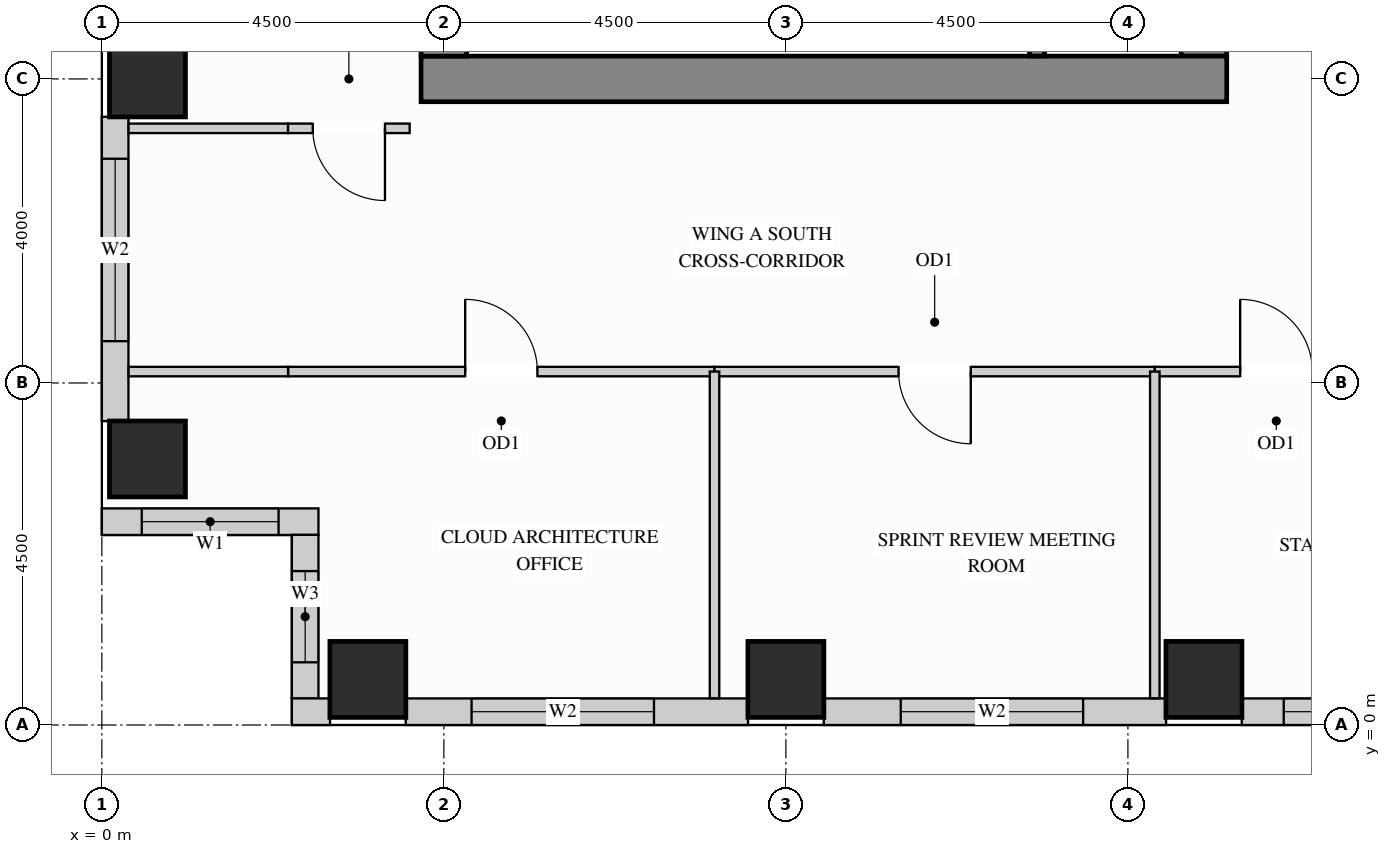
"""IFC4 building model, lengths in metres.
Left out: names, types, materials, properties, quantities, classifications, styles, units other than length and angle.
Written with IfcOpenShell. Run it as: python <this file> out.ifc"""

import sys

from ifc_helpers import new_model, si_unit, direction, frame, frame_2d, origin, origin_2d, place, context, subcontext, project, spatial, rectangle, extrude, source, transform, mapped, element, fill, save


model = new_model("IFC4")
c1 = context("Model", 3, precision=1e-05, world=origin(), true_north=direction((0.0, 1.0)))
c2 = subcontext(c1, "Body", "Model", "MODEL_VIEW")
j1 = project(units=[si_unit("LENGTHUNIT", "METRE"), si_unit("PLANEANGLEUNIT", "RADIAN")], contexts=[c1])
p1 = place(None, origin())
s1 = spatial("IfcSite", under=j1, at=p1, CompositionType="ELEMENT")
p2 = place(p1, origin())
s2 = spatial("IfcBuilding", under=s1, at=p2, CompositionType="ELEMENT")
p3 = place(p2, frame((0.0, 0.0, 168.3)))
s3 = spatial("IfcBuildingStorey", under=s2, at=p3, CompositionType="ELEMENT", Elevation=168.3)
m1 = source(origin(), c2, "Body", "SweptSolid", [
    extrude(rectangle(XDim=1.0, YDim=1.0, at=origin_2d()), origin(), (0.0, 0.0, 1.0), 3.4),
])
for number, where, z_axis, x_axis in (
    (1, (14.5, 0.6, 0.0), (0.0, 0.0, 1.0), (1.0, 0.0, 0.0)),
    (2, (3.5, 0.6, 0.0), (0.0, 0.0, 1.0), (1.0, 0.0, 0.0)),
    (3, (9.0, 0.6, 0.0), (0.0, 0.0, 1.0), (1.0, 0.0, 0.0)),
    (4, (0.6, 3.5, 0.0), (0.0, 0.0, 1.0), (1.0, 0.0, 0.0)),
    (5, (0.6, 8.5, 0.0), (0.0, 0.0, 1.0), (1.0, 0.0, 0.0)),
):
    element("IfcColumn", number, at=place(p3, frame(where, z_axis=z_axis, x_axis=x_axis)), inside=s3, PredefinedType="COLUMN", context=c2, shape_type="MappedRepresentation", body=[
        mapped(m1, transform((0.0, 0.0, 0.0), x_axis=(1.0, 0.0, 0.0), y_axis=(0.0, 1.0, 0.0), z_axis=(0.0, 0.0, 1.0))),
    ])
m2 = source(origin(), c2, "Body", "SweptSolid", [
    extrude(rectangle(XDim=10.02, YDim=0.6, at=frame_2d((5.01, 0.0))), origin(), (0.0, 0.0, 1.0), 3.4),
])
p4 = place(p3, frame((14.5, 8.8, 0.0), z_axis=(0.0, 0.0, 1.0), x_axis=(0.0, 1.0, 0.0)))
e6 = element("IfcWall", 6, at=p4, inside=s3, PredefinedType="SHEAR", context=c2, shape_type="MappedRepresentation", body=[
    mapped(m2, transform((0.0, 0.0, 0.0), x_axis=(1.0, 0.0, 0.0), y_axis=(0.0, 1.0, 0.0), z_axis=(0.0, 0.0, 1.0))),
])
m3 = source(origin(), c2, "Body", "SweptSolid", [
    extrude(rectangle(XDim=10.6, YDim=0.6, at=frame_2d((5.3, 0.0))), origin(), (0.0, 0.0, 1.0), 3.4),
])
p5 = place(p3, frame((4.2, 8.5, 0.0), z_axis=(0.0, 0.0, 1.0), x_axis=(1.0, 0.0, 0.0)))
e7 = element("IfcWall", 7, at=p5, inside=s3, PredefinedType="SHEAR", context=c2, shape_type="MappedRepresentation", body=[
    mapped(m3, transform((0.0, 0.0, 0.0), x_axis=(1.0, 0.0, 0.0), y_axis=(0.0, 1.0, 0.0), z_axis=(0.0, 0.0, 1.0))),
])
m4 = source(origin(), c2, "Body", "SweptSolid", [
    extrude(rectangle(XDim=20.4, YDim=0.6, at=frame_2d((10.2, 0.0))), origin(), (0.0, 0.0, 1.0), 3.4),
])
p6 = place(p3, frame((4.5, 8.8, 0.0), z_axis=(0.0, 0.0, 1.0), x_axis=(0.0, 1.0, 0.0)))
e8 = element("IfcWall", 8, at=p6, inside=s3, PredefinedType="SHEAR", context=c2, shape_type="MappedRepresentation", body=[
    mapped(m4, transform((0.0, 0.0, 0.0), x_axis=(1.0, 0.0, 0.0), y_axis=(0.0, 1.0, 0.0), z_axis=(0.0, 0.0, 1.0))),
])
p7 = place(p3, frame((0.175, 8.002, 0.0), z_axis=(0.0, 0.0, 1.0), x_axis=(0.0, -1.0, 0.0)))
e9 = element("IfcWall", 9, at=p7, inside=s3, PredefinedType="SOLIDWALL", context=c2, shape_type="SweptSolid", body=[
    extrude(rectangle(XDim=4.004, YDim=0.35, at=frame_2d((2.002, 0.0))), origin(), (0.0, 0.0, 1.0), 2.612),
])
p8 = place(p7, frame((0.552, 0.0, 0.78)))
e10 = element("IfcOpeningElement", 10, at=p8, cuts=e9, PredefinedType="OPENING", context=c2, shape_type="SweptSolid", body=[
    extrude(rectangle(XDim=2.4, YDim=1.652, at=frame_2d((1.2, 0.826))), frame((0.0, 0.185, 0.0), z_axis=(0.0, -1.0, 0.0), x_axis=(1.0, 0.0, 0.0)), (0.0, 0.0, 1.0), 0.37),
])
p9 = place(p3, frame((0.0, 2.675, 0.0), z_axis=(0.0, 0.0, 1.0), x_axis=(1.0, 0.0, 0.0)))
e11 = element("IfcWall", 11, at=p9, inside=s3, PredefinedType="SOLIDWALL", context=c2, shape_type="SweptSolid", body=[
    extrude(rectangle(XDim=2.85, YDim=0.35, at=frame_2d((1.425, 0.0))), origin(), (0.0, 0.0, 1.0), 3.385),
])
p10 = place(p9, frame((0.525, 0.0, 0.78)))
e12 = element("IfcOpeningElement", 12, at=p10, cuts=e11, PredefinedType="OPENING", context=c2, shape_type="SweptSolid", body=[
    extrude(rectangle(XDim=1.8, YDim=2.1, at=frame_2d((0.9, 1.05))), frame((0.0, 0.185, 0.0), z_axis=(0.0, -1.0, 0.0), x_axis=(1.0, 0.0, 0.0)), (0.0, 0.0, 1.0), 0.37),
])
p11 = place(p3, frame((2.675, 2.502, 0.0), z_axis=(0.0, 0.0, 1.0), x_axis=(0.0, -1.0, 0.0)))
e13 = element("IfcWall", 13, at=p11, inside=s3, PredefinedType="SOLIDWALL", context=c2, shape_type="SweptSolid", body=[
    extrude(rectangle(XDim=2.154, YDim=0.35, at=frame_2d((1.077, 0.0))), origin(), (0.0, 0.0, 1.0), 3.385),
])
p12 = place(p11, frame((0.477, 0.0, 0.78)))
e14 = element("IfcOpeningElement", 14, at=p12, cuts=e13, PredefinedType="OPENING", context=c2, shape_type="SweptSolid", body=[
    extrude(rectangle(XDim=1.2, YDim=2.1, at=frame_2d((0.6, 1.05))), frame((0.0, 0.185, 0.0), z_axis=(0.0, -1.0, 0.0), x_axis=(1.0, 0.0, 0.0)), (0.0, 0.0, 1.0), 0.37),
])
m5 = source(origin(), c2, "Body", "SweptSolid", [
    extrude(rectangle(XDim=0.502, YDim=0.35, at=frame_2d((0.251, 0.0))), origin(), (0.0, 0.0, 1.0), 3.385),
])
p13 = place(p3, frame((2.5, 0.175, 0.0), z_axis=(0.0, 0.0, 1.0), x_axis=(1.0, 0.0, 0.0)))
e15 = element("IfcWall", 15, at=p13, inside=s3, PredefinedType="SOLIDWALL", context=c2, shape_type="MappedRepresentation", body=[
    mapped(m5, transform((0.0, 0.0, 0.0), x_axis=(1.0, 0.0, 0.0), y_axis=(0.0, 1.0, 0.0), z_axis=(0.0, 0.0, 1.0))),
])
p14 = place(p3, frame((3.998, 0.175, 0.0), z_axis=(0.0, 0.0, 1.0), x_axis=(1.0, 0.0, 0.0)))
e16 = element("IfcWall", 16, at=p14, inside=s3, PredefinedType="SOLIDWALL", context=c2, shape_type="SweptSolid", body=[
    extrude(rectangle(XDim=4.504, YDim=0.35, at=frame_2d((2.252, 0.0))), origin(), (0.0, 0.0, 1.0), 2.612),
])
p15 = place(p14, frame((0.866, 0.0, 0.78)))
e17 = element("IfcOpeningElement", 17, at=p15, cuts=e16, PredefinedType="OPENING", context=c2, shape_type="SweptSolid", body=[
    extrude(rectangle(XDim=2.4, YDim=1.652, at=frame_2d((1.2, 0.826))), frame((0.0, 0.185, 0.0), z_axis=(0.0, -1.0, 0.0), x_axis=(1.0, 0.0, 0.0)), (0.0, 0.0, 1.0), 0.37),
])
p16 = place(p3, frame((9.498, 0.175, 0.0), z_axis=(0.0, 0.0, 1.0), x_axis=(1.0, 0.0, 0.0)))
e18 = element("IfcWall", 18, at=p16, inside=s3, PredefinedType="SOLIDWALL", context=c2, shape_type="SweptSolid", body=[
    extrude(rectangle(XDim=4.504, YDim=0.35, at=frame_2d((2.252, 0.0))), origin(), (0.0, 0.0, 1.0), 2.612),
])
p17 = place(p16, frame((1.013, 0.0, 0.78)))
e19 = element("IfcOpeningElement", 19, at=p17, cuts=e18, PredefinedType="OPENING", context=c2, shape_type="SweptSolid", body=[
    extrude(rectangle(XDim=2.4, YDim=1.652, at=frame_2d((1.2, 0.826))), frame((0.0, 0.185, 0.0), z_axis=(0.0, -1.0, 0.0), x_axis=(1.0, 0.0, 0.0)), (0.0, 0.0, 1.0), 0.37),
])
p18 = place(p3, frame((14.998, 0.175, 0.0), z_axis=(0.0, 0.0, 1.0), x_axis=(1.0, 0.0, 0.0)))
e20 = element("IfcWall", 20, at=p18, inside=s3, PredefinedType="SOLIDWALL", context=c2, shape_type="SweptSolid", body=[
    extrude(rectangle(XDim=3.504, YDim=0.35, at=frame_2d((1.752, 0.0))), origin(), (0.0, 0.0, 1.0), 2.612),
])
p19 = place(p18, frame((0.552, 0.0, 0.78)))
e21 = element("IfcOpeningElement", 21, at=p19, cuts=e20, PredefinedType="OPENING", context=c2, shape_type="SweptSolid", body=[
    extrude(rectangle(XDim=2.4, YDim=1.652, at=frame_2d((1.2, 0.826))), frame((0.0, 0.185, 0.0), z_axis=(0.0, -1.0, 0.0), x_axis=(1.0, 0.0, 0.0)), (0.0, 0.0, 1.0), 0.37),
])
m6 = source(origin(), c2, "Body", "SweptSolid", [
    extrude(rectangle(XDim=2.098, YDim=0.125, at=frame_2d((1.049, 0.0))), origin(), (0.0, 0.0, 1.0), 3.385),
])
p20 = place(p3, frame((0.352, 7.85, 0.0), z_axis=(0.0, 0.0, 1.0), x_axis=(1.0, 0.0, 0.0)))
e22 = element("IfcWall", 22, at=p20, inside=s3, PredefinedType="PARTITIONING", context=c2, shape_type="MappedRepresentation", body=[
    mapped(m6, transform((0.0, 0.0, 0.0), x_axis=(1.0, 0.0, 0.0), y_axis=(0.0, 1.0, 0.0), z_axis=(0.0, 0.0, 1.0))),
])
p21 = place(p3, frame((2.45, 7.85, 0.0), z_axis=(0.0, 0.0, 1.0), x_axis=(1.0, 0.0, 0.0)))
e23 = element("IfcWall", 23, at=p21, inside=s3, PredefinedType="PARTITIONING", context=c2, shape_type="SweptSolid", body=[
    extrude(rectangle(XDim=1.6, YDim=0.125, at=frame_2d((0.8, 0.0))), origin(), (0.0, 0.0, 1.0), 3.385),
])
p22 = place(p21, frame((0.325, 0.0, 0.0)))
e24 = element("IfcOpeningElement", 24, at=p22, cuts=e23, PredefinedType="OPENING", context=c2, shape_type="SweptSolid", body=[
    extrude(rectangle(XDim=0.95, YDim=2.15, at=frame_2d((0.475, 1.075))), frame((0.0, 0.073, 0.0), z_axis=(0.0, -1.0, 0.0), x_axis=(1.0, 0.0, 0.0)), (0.0, 0.0, 1.0), 0.145),
])
p23 = place(p3, frame((2.45, 4.65, 0.0), z_axis=(0.0, 0.0, 1.0), x_axis=(1.0, 0.0, 0.0)))
e25 = element("IfcWall", 25, at=p23, inside=s3, PredefinedType="PARTITIONING", context=c2, shape_type="SweptSolid", body=[
    extrude(rectangle(XDim=5.611, YDim=0.125, at=frame_2d((2.806, 0.0))), origin(), (0.0, 0.0, 1.0), 2.848),
])
p24 = place(p23, frame((2.331, 0.0, 0.0)))
e26 = element("IfcOpeningElement", 26, at=p24, cuts=e25, PredefinedType="OPENING", context=c2, shape_type="SweptSolid", body=[
    extrude(rectangle(XDim=0.95, YDim=2.15, at=frame_2d((0.475, 1.075))), frame((0.0, 0.073, 0.0), z_axis=(0.0, -1.0, 0.0), x_axis=(1.0, 0.0, 0.0)), (0.0, 0.0, 1.0), 0.145),
])
p25 = place(p3, frame((8.061, 4.65, 0.0), z_axis=(0.0, 0.0, 1.0), x_axis=(1.0, 0.0, 0.0)))
e27 = element("IfcWall", 27, at=p25, inside=s3, PredefinedType="PARTITIONING", context=c2, shape_type="SweptSolid", body=[
    extrude(rectangle(XDim=5.793, YDim=0.125, at=frame_2d((2.896, 0.0))), origin(), (0.0, 0.0, 1.0), 2.848),
])
p26 = place(p25, frame((2.421, 0.0, 0.0)))
e28 = element("IfcOpeningElement", 28, at=p26, cuts=e27, PredefinedType="OPENING", context=c2, shape_type="SweptSolid", body=[
    extrude(rectangle(XDim=0.95, YDim=2.15, at=frame_2d((0.475, 1.075))), frame((0.0, 0.073, 0.0), z_axis=(0.0, -1.0, 0.0), x_axis=(1.0, 0.0, 0.0)), (0.0, 0.0, 1.0), 0.145),
])
p27 = place(p3, frame((13.854, 4.65, 0.0), z_axis=(0.0, 0.0, 1.0), x_axis=(1.0, 0.0, 0.0)))
e29 = element("IfcWall", 29, at=p27, inside=s3, PredefinedType="PARTITIONING", context=c2, shape_type="SweptSolid", body=[
    extrude(rectangle(XDim=3.196, YDim=0.125, at=frame_2d((1.598, 0.0))), origin(), (0.0, 0.0, 1.0), 2.848),
])
p28 = place(p27, frame((1.123, 0.0, 0.0)))
e30 = element("IfcOpeningElement", 30, at=p28, cuts=e29, PredefinedType="OPENING", context=c2, shape_type="SweptSolid", body=[
    extrude(rectangle(XDim=0.95, YDim=2.15, at=frame_2d((0.475, 1.075))), frame((0.0, 0.073, 0.0), z_axis=(0.0, -1.0, 0.0), x_axis=(1.0, 0.0, 0.0)), (0.0, 0.0, 1.0), 0.145),
])
m7 = source(origin(), c2, "Body", "SweptSolid", [
    extrude(rectangle(XDim=2.098, YDim=0.125, at=frame_2d((1.049, 0.0))), origin(), (0.0, 0.0, 1.0), 2.848),
])
p29 = place(p3, frame((0.352, 4.65, 0.0), z_axis=(0.0, 0.0, 1.0), x_axis=(1.0, 0.0, 0.0)))
e31 = element("IfcWall", 31, at=p29, inside=s3, PredefinedType="PARTITIONING", context=c2, shape_type="MappedRepresentation", body=[
    mapped(m7, transform((0.0, 0.0, 0.0), x_axis=(1.0, 0.0, 0.0), y_axis=(0.0, 1.0, 0.0), z_axis=(0.0, 0.0, 1.0))),
])
m8 = source(origin(), c2, "Body", "SweptSolid", [
    extrude(rectangle(XDim=4.298, YDim=0.125, at=frame_2d((2.149, 0.0))), origin(), (0.0, 0.0, 1.0), 3.385),
])
for number, where, z_axis, x_axis in (
    (32, (8.061, 0.352, 0.0), (0.0, 0.0, 1.0), (0.0, 1.0, 0.0)),
    (33, (13.854, 0.352, 0.0), (0.0, 0.0, 1.0), (0.0, 1.0, 0.0)),
):
    element("IfcWall", number, at=place(p3, frame(where, z_axis=z_axis, x_axis=x_axis)), inside=s3, PredefinedType="PARTITIONING", context=c2, shape_type="MappedRepresentation", body=[
        mapped(m8, transform((0.0, 0.0, 0.0), x_axis=(1.0, 0.0, 0.0), y_axis=(0.0, 1.0, 0.0), z_axis=(0.0, 0.0, 1.0))),
    ])
m9 = source(origin(), c2, "Body", "SweptSolid", [
    extrude(rectangle(XDim=3.753, YDim=0.2, at=frame_2d((1.876, 0.0))), origin(), (0.0, 0.0, 1.0), 3.4),
])
p30 = place(p3, frame((12.305, 8.802, 0.0), z_axis=(0.0, 0.0, 1.0), x_axis=(0.0, 1.0, 0.0)))
e34 = element("IfcWall", 34, at=p30, inside=s3, PredefinedType="SHEAR", context=c2, shape_type="MappedRepresentation", body=[
    mapped(m9, transform((0.0, 0.0, 0.0), x_axis=(1.0, 0.0, 0.0), y_axis=(0.0, 1.0, 0.0), z_axis=(0.0, 0.0, 1.0))),
])
m10 = source(origin(), c2, "Body", "SweptSolid", [
    extrude(rectangle(XDim=0.95, YDim=2.15, at=frame_2d((0.475, 1.075))), frame((0.0, 0.025, 0.0), z_axis=(0.0, -1.0, 0.0), x_axis=(1.0, 0.0, 0.0)), (0.0, 0.0, 1.0), 0.05),
])
p31 = place(p24, origin())
e35 = element("IfcDoor", 35, at=p31, inside=s3, OperationType="SINGLE_SWING_LEFT", PredefinedType="DOOR", context=c2, shape_type="MappedRepresentation", body=[
    mapped(m10, transform((0.0, 0.0, 0.0), x_axis=(1.0, 0.0, 0.0), y_axis=(0.0, 1.0, 0.0), z_axis=(0.0, 0.0, 1.0))),
])
fill(e26, e35)
p32 = place(p26, origin())
e36 = element("IfcDoor", 36, at=p32, inside=s3, OperationType="SINGLE_SWING_RIGHT", PredefinedType="DOOR", context=c2, shape_type="MappedRepresentation", body=[
    mapped(m10, transform((0.0, 0.0, 0.0), x_axis=(1.0, 0.0, 0.0), y_axis=(0.0, 1.0, 0.0), z_axis=(0.0, 0.0, 1.0))),
])
fill(e28, e36)
p33 = place(p28, origin())
e37 = element("IfcDoor", 37, at=p33, inside=s3, OperationType="SINGLE_SWING_LEFT", PredefinedType="DOOR", context=c2, shape_type="MappedRepresentation", body=[
    mapped(m10, transform((0.0, 0.0, 0.0), x_axis=(1.0, 0.0, 0.0), y_axis=(0.0, 1.0, 0.0), z_axis=(0.0, 0.0, 1.0))),
])
fill(e30, e37)
p34 = place(p22, origin())
e38 = element("IfcDoor", 38, at=p34, inside=s3, OperationType="SINGLE_SWING_RIGHT", PredefinedType="DOOR", context=c2, shape_type="MappedRepresentation", body=[
    mapped(m10, transform((0.0, 0.0, 0.0), x_axis=(1.0, 0.0, 0.0), y_axis=(0.0, 1.0, 0.0), z_axis=(0.0, 0.0, 1.0))),
])
fill(e24, e38)
m11 = source(origin(), c2, "Body", "SweptSolid", [
    extrude(rectangle(XDim=1.8, YDim=2.1, at=frame_2d((0.9, 1.05))), frame((0.0, 0.03, 0.0), z_axis=(0.0, -1.0, 0.0), x_axis=(1.0, 0.0, 0.0)), (0.0, 0.0, 1.0), 0.06),
])
p35 = place(p10, origin())
e39 = element("IfcWindow", 39, at=p35, inside=s3, PartitioningType="SINGLE_PANEL", PredefinedType="WINDOW", context=c2, shape_type="MappedRepresentation", body=[
    mapped(m11, transform((0.0, 0.0, 0.0), x_axis=(1.0, 0.0, 0.0), y_axis=(0.0, 1.0, 0.0), z_axis=(0.0, 0.0, 1.0))),
])
fill(e12, e39)
m12 = source(origin(), c2, "Body", "SweptSolid", [
    extrude(rectangle(XDim=2.4, YDim=1.652, at=frame_2d((1.2, 0.826))), frame((0.0, 0.03, 0.0), z_axis=(0.0, -1.0, 0.0), x_axis=(1.0, 0.0, 0.0)), (0.0, 0.0, 1.0), 0.06),
])
p36 = place(p8, origin())
e40 = element("IfcWindow", 40, at=p36, inside=s3, PartitioningType="SINGLE_PANEL", PredefinedType="WINDOW", context=c2, shape_type="MappedRepresentation", body=[
    mapped(m12, transform((0.0, 0.0, 0.0), x_axis=(1.0, 0.0, 0.0), y_axis=(0.0, 1.0, 0.0), z_axis=(0.0, 0.0, 1.0))),
])
fill(e10, e40)
p37 = place(p15, origin())
e41 = element("IfcWindow", 41, at=p37, inside=s3, PartitioningType="SINGLE_PANEL", PredefinedType="WINDOW", context=c2, shape_type="MappedRepresentation", body=[
    mapped(m12, transform((0.0, 0.0, 0.0), x_axis=(1.0, 0.0, 0.0), y_axis=(0.0, 1.0, 0.0), z_axis=(0.0, 0.0, 1.0))),
])
fill(e17, e41)
p38 = place(p17, origin())
e42 = element("IfcWindow", 42, at=p38, inside=s3, PartitioningType="SINGLE_PANEL", PredefinedType="WINDOW", context=c2, shape_type="MappedRepresentation", body=[
    mapped(m12, transform((0.0, 0.0, 0.0), x_axis=(1.0, 0.0, 0.0), y_axis=(0.0, 1.0, 0.0), z_axis=(0.0, 0.0, 1.0))),
])
fill(e19, e42)
p39 = place(p19, origin())
e43 = element("IfcWindow", 43, at=p39, inside=s3, PartitioningType="SINGLE_PANEL", PredefinedType="WINDOW", context=c2, shape_type="MappedRepresentation", body=[
    mapped(m12, transform((0.0, 0.0, 0.0), x_axis=(1.0, 0.0, 0.0), y_axis=(0.0, 1.0, 0.0), z_axis=(0.0, 0.0, 1.0))),
])
fill(e21, e43)
m13 = source(origin(), c2, "Body", "SweptSolid", [
    extrude(rectangle(XDim=1.2, YDim=2.1, at=frame_2d((0.6, 1.05))), frame((0.0, 0.03, 0.0), z_axis=(0.0, -1.0, 0.0), x_axis=(1.0, 0.0, 0.0)), (0.0, 0.0, 1.0), 0.06),
])
p40 = place(p12, origin())
e44 = element("IfcWindow", 44, at=p40, inside=s3, PartitioningType="SINGLE_PANEL", PredefinedType="WINDOW", context=c2, shape_type="MappedRepresentation", body=[
    mapped(m13, transform((0.0, 0.0, 0.0), x_axis=(1.0, 0.0, 0.0), y_axis=(0.0, 1.0, 0.0), z_axis=(0.0, 0.0, 1.0))),
])
fill(e14, e44)
save(model, sys.argv[1])
